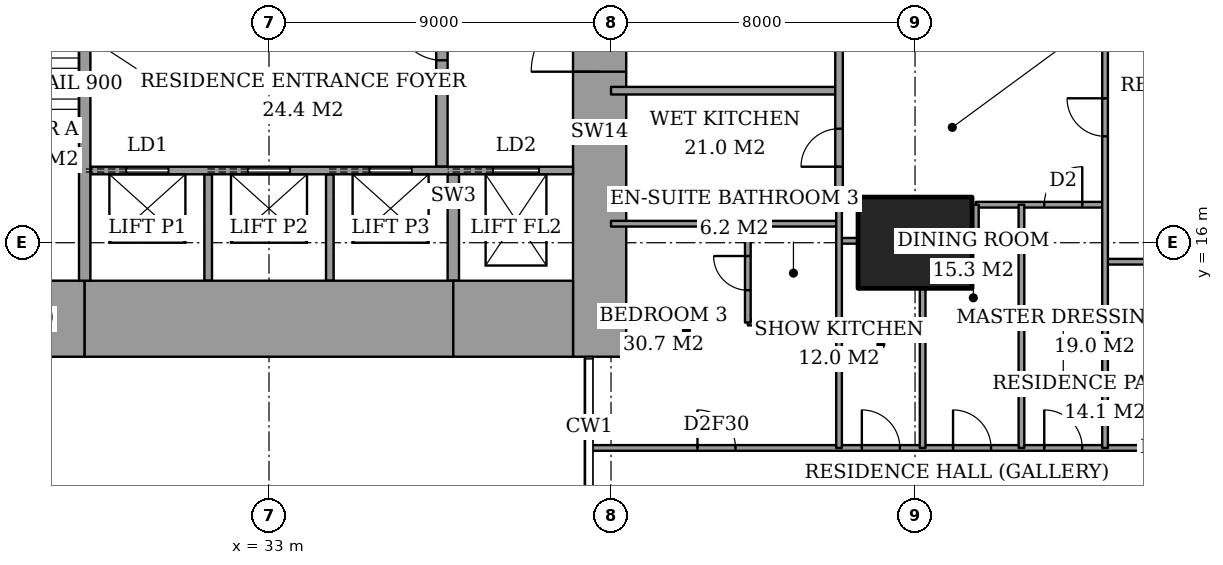
"""IFC4 building model, lengths in metres.
Left out: names, types, materials, properties, quantities, classifications, styles, units other than length and angle.
Written with IfcOpenShell. Run it as: python <this file> out.ifc"""

import sys

from ifc_helpers import new_model, si_unit, direction, frame, frame_2d, origin, origin_2d, place, context, subcontext, project, spatial, rectangle, extrude, element, fill, save


model = new_model("IFC4")
c1 = context("Model", 3, precision=1e-05, world=origin(), true_north=direction((0.0, 1.0)))
c2 = subcontext(c1, "Body", "Model", "MODEL_VIEW")
j1 = project(units=[si_unit("LENGTHUNIT", "METRE"), si_unit("PLANEANGLEUNIT", "RADIAN")], contexts=[c1])
p1 = place(None, origin())
s1 = spatial("IfcSite", under=j1, at=p1, CompositionType="ELEMENT")
p2 = place(p1, origin())
s2 = spatial("IfcBuilding", under=s1, at=p2, CompositionType="ELEMENT")
p3 = place(p2, frame((0.0, 0.0, 62.0)))
s3 = spatial("IfcBuildingStorey", under=s2, at=p3, CompositionType="ELEMENT", Elevation=62.0)
p4 = place(p3, frame((50.0, 16.0, 0.0), z_axis=(0.0, 0.0, 1.0), x_axis=(1.0, 0.0, 0.0)))
e1 = element("IfcColumn", 1, at=p4, inside=s3, PredefinedType="COLUMN", context=c2, shape_type="SweptSolid", body=[
    extrude(rectangle(XDim=3.0, YDim=2.4, at=origin_2d()), origin(), (0.0, 0.0, 1.0), 3.6),
])
p5 = place(p3, frame((25.0, 14.0, 0.0), z_axis=(0.0, 0.0, 1.0), x_axis=(1.0, 0.0, 0.0)))
e2 = element("IfcWall", 2, at=p5, inside=s3, PredefinedType="SHEAR", context=c2, shape_type="SweptSolid", body=[
    extrude(rectangle(XDim=3.15, YDim=2.0, at=frame_2d((1.575, 0.0))), origin(), (0.0, 0.0, 1.0), 3.6),
])
p6 = place(p3, frame((28.15, 14.0, 0.0), z_axis=(0.0, 0.0, 1.0), x_axis=(1.0, 0.0, 0.0)))
e3 = element("IfcWall", 3, at=p6, inside=s3, PredefinedType="SHEAR", context=c2, shape_type="SweptSolid", body=[
    extrude(rectangle(XDim=9.7, YDim=2.0, at=frame_2d((4.85, 0.0))), origin(), (0.0, 0.0, 1.0), 3.6),
])
p7 = place(p3, frame((37.85, 14.0, 0.0), z_axis=(0.0, 0.0, 1.0), x_axis=(1.0, 0.0, 0.0)))
e4 = element("IfcWall", 4, at=p7, inside=s3, PredefinedType="SHEAR", context=c2, shape_type="SweptSolid", body=[
    extrude(rectangle(XDim=3.15, YDim=2.0, at=frame_2d((1.575, 0.0))), origin(), (0.0, 0.0, 1.0), 3.6),
])
p8 = place(p3, frame((41.7, 13.0, 0.0), z_axis=(0.0, 0.0, 1.0), x_axis=(0.0, 1.0, 0.0)))
e5 = element("IfcWall", 5, at=p8, inside=s3, PredefinedType="SHEAR", context=c2, shape_type="SweptSolid", body=[
    extrude(rectangle(XDim=11.85, YDim=1.4, at=frame_2d((5.925, 0.0))), origin(), (0.0, 0.0, 1.0), 3.6),
])
p9 = place(p8, frame((7.5, 0.0, 0.0)))
e6 = element("IfcOpeningElement", 6, at=p9, cuts=e5, PredefinedType="OPENING", context=c2, shape_type="SweptSolid", body=[
    extrude(rectangle(XDim=1.8, YDim=2.4, at=frame_2d((0.9, 1.2))), frame((0.0, 0.71, 0.0), z_axis=(0.0, -1.0, 0.0), x_axis=(1.0, 0.0, 0.0)), (0.0, 0.0, 1.0), 1.42),
])
p10 = place(p3, frame((28.15, 15.0, 0.0), z_axis=(0.0, 0.0, 1.0), x_axis=(0.0, 1.0, 0.0)))
e7 = element("IfcWall", 7, at=p10, inside=s3, PredefinedType="SHEAR", context=c2, shape_type="SweptSolid", body=[
    extrude(rectangle(XDim=8.15, YDim=0.3, at=frame_2d((4.075, 0.0))), origin(), (0.0, 0.0, 1.0), 3.6),
])
p11 = place(p3, frame((37.55, 18.0, 0.0), z_axis=(0.0, 0.0, 1.0), x_axis=(0.0, 1.0, 0.0)))
e8 = element("IfcWall", 8, at=p11, inside=s3, PredefinedType="PARTITIONING", context=c2, shape_type="SweptSolid", body=[
    extrude(rectangle(XDim=6.7, YDim=0.3, at=frame_2d((3.35, 0.0))), origin(), (0.0, 0.0, 1.0), 3.6),
])
p12 = place(p11, frame((2.8, 0.0, 0.0)))
e9 = element("IfcOpeningElement", 9, at=p12, cuts=e8, PredefinedType="OPENING", context=c2, shape_type="SweptSolid", body=[
    extrude(rectangle(XDim=1.2, YDim=2.1, at=frame_2d((0.6, 1.05))), frame((0.0, 0.16, 0.0), z_axis=(0.0, -1.0, 0.0), x_axis=(1.0, 0.0, 0.0)), (0.0, 0.0, 1.0), 0.32),
])
p13 = place(p3, frame((41.439, 10.6, 0.0), z_axis=(0.0, 0.0, 1.0), x_axis=(1.0, 0.0, 0.0)))
e10 = element("IfcWall", 10, at=p13, inside=s3, PredefinedType="PARTITIONING", context=c2, shape_type="SweptSolid", body=[
    extrude(rectangle(XDim=25.011, YDim=0.15, at=frame_2d((12.505, 0.0))), origin(), (0.0, 0.0, 1.0), 3.35),
])
p14 = place(p13, frame((11.961, 0.0, 0.0)))
e11 = element("IfcOpeningElement", 11, at=p14, cuts=e10, PredefinedType="OPENING", context=c2, shape_type="SweptSolid", body=[
    extrude(rectangle(XDim=1.0, YDim=2.1, at=frame_2d((0.5, 1.05))), frame((0.0, 0.085, 0.0), z_axis=(0.0, -1.0, 0.0), x_axis=(1.0, 0.0, 0.0)), (0.0, 0.0, 1.0), 0.17),
])
p15 = place(p13, frame((20.924, 0.0, 0.0)))
e12 = element("IfcOpeningElement", 12, at=p15, cuts=e10, PredefinedType="OPENING", context=c2, shape_type="SweptSolid", body=[
    extrude(rectangle(XDim=1.0, YDim=2.1, at=frame_2d((0.5, 1.05))), frame((0.0, 0.085, 0.0), z_axis=(0.0, -1.0, 0.0), x_axis=(1.0, 0.0, 0.0)), (0.0, 0.0, 1.0), 0.17),
])
p16 = place(p13, frame((9.561, 0.0, 0.0)))
e13 = element("IfcOpeningElement", 13, at=p16, cuts=e10, PredefinedType="OPENING", context=c2, shape_type="SweptSolid", body=[
    extrude(rectangle(XDim=1.0, YDim=2.1, at=frame_2d((0.5, 1.05))), frame((0.0, 0.085, 0.0), z_axis=(0.0, -1.0, 0.0), x_axis=(1.0, 0.0, 0.0)), (0.0, 0.0, 1.0), 0.17),
])
p17 = place(p13, frame((7.161, 0.0, 0.0)))
e14 = element("IfcOpeningElement", 14, at=p17, cuts=e10, PredefinedType="OPENING", context=c2, shape_type="SweptSolid", body=[
    extrude(rectangle(XDim=1.0, YDim=2.1, at=frame_2d((0.5, 1.05))), frame((0.0, 0.085, 0.0), z_axis=(0.0, -1.0, 0.0), x_axis=(1.0, 0.0, 0.0)), (0.0, 0.0, 1.0), 0.17),
])
p18 = place(p13, frame((2.836, 0.0, 0.0)))
e15 = element("IfcOpeningElement", 15, at=p18, cuts=e10, PredefinedType="OPENING", context=c2, shape_type="SweptSolid", body=[
    extrude(rectangle(XDim=1.0, YDim=2.1, at=frame_2d((0.5, 1.05))), frame((0.0, 0.085, 0.0), z_axis=(0.0, -1.0, 0.0), x_axis=(1.0, 0.0, 0.0)), (0.0, 0.0, 1.0), 0.17),
])
p19 = place(p3, frame((45.6, 13.9, 0.0), z_axis=(0.0, 0.0, 1.0), x_axis=(1.0, 0.0, 0.0)))
e16 = element("IfcWall", 16, at=p19, inside=s3, PredefinedType="PARTITIONING", context=c2, shape_type="SweptSolid", body=[
    extrude(rectangle(XDim=2.4, YDim=0.15, at=frame_2d((1.2, 0.0))), origin(), (0.0, 0.0, 1.0), 3.35),
])
p20 = place(p3, frame((55.0, 15.5, 0.0), z_axis=(0.0, 0.0, 1.0), x_axis=(1.0, 0.0, 0.0)))
e17 = element("IfcWall", 17, at=p20, inside=s3, PredefinedType="PARTITIONING", context=c2, shape_type="SweptSolid", body=[
    extrude(rectangle(XDim=1.5, YDim=0.15, at=frame_2d((0.75, 0.0))), origin(), (0.0, 0.0, 1.0), 3.35),
])
p21 = place(p3, frame((48.0, 16.05, 0.0), z_axis=(0.0, 0.0, 1.0), x_axis=(1.0, 0.0, 0.0)))
e18 = element("IfcWall", 18, at=p21, inside=s3, PredefinedType="PARTITIONING", context=c2, shape_type="SweptSolid", body=[
    extrude(rectangle(XDim=0.5, YDim=0.15, at=frame_2d((0.25, 0.0))), origin(), (0.0, 0.0, 1.0), 2.634),
])
p22 = place(p3, frame((42.0, 16.5, 0.0), z_axis=(0.0, 0.0, 1.0), x_axis=(1.0, 0.0, 0.0)))
e19 = element("IfcWall", 19, at=p22, inside=s3, PredefinedType="PARTITIONING", context=c2, shape_type="SweptSolid", body=[
    extrude(rectangle(XDim=6.0, YDim=0.15, at=frame_2d((3.0, 0.0))), origin(), (0.0, 0.0, 1.0), 3.35),
])
p23 = place(p3, frame((51.6, 17.0, 0.0), z_axis=(0.0, 0.0, 1.0), x_axis=(1.0, 0.0, 0.0)))
e20 = element("IfcWall", 20, at=p23, inside=s3, PredefinedType="PARTITIONING", context=c2, shape_type="SweptSolid", body=[
    extrude(rectangle(XDim=3.4, YDim=0.15, at=frame_2d((1.7, 0.0))), origin(), (0.0, 0.0, 1.0), 3.35),
])
p24 = place(p23, frame((1.8, 0.0, 0.0)))
e21 = element("IfcOpeningElement", 21, at=p24, cuts=e20, PredefinedType="OPENING", context=c2, shape_type="SweptSolid", body=[
    extrude(rectangle(XDim=1.0, YDim=2.1, at=frame_2d((0.5, 1.05))), frame((0.0, 0.085, 0.0), z_axis=(0.0, -1.0, 0.0), x_axis=(1.0, 0.0, 0.0)), (0.0, 0.0, 1.0), 0.17),
])
p25 = place(p3, frame((42.0, 20.0, 0.0), z_axis=(0.0, 0.0, 1.0), x_axis=(1.0, 0.0, 0.0)))
e22 = element("IfcWall", 22, at=p25, inside=s3, PredefinedType="PARTITIONING", context=c2, shape_type="SweptSolid", body=[
    extrude(rectangle(XDim=6.0, YDim=0.2, at=frame_2d((3.0, 0.0))), origin(), (0.0, 0.0, 1.0), 3.35),
])
p26 = place(p3, frame((45.6, 13.9, 0.0), z_axis=(0.0, 0.0, 1.0), x_axis=(0.0, 1.0, 0.0)))
e23 = element("IfcWall", 23, at=p26, inside=s3, PredefinedType="PARTITIONING", context=c2, shape_type="SweptSolid", body=[
    extrude(rectangle(XDim=2.6, YDim=0.15, at=frame_2d((1.3, 0.0))), origin(), (0.0, 0.0, 1.0), 3.35),
])
p27 = place(p26, frame((0.85, 0.0, 0.0)))
e24 = element("IfcOpeningElement", 24, at=p27, cuts=e23, PredefinedType="OPENING", context=c2, shape_type="SweptSolid", body=[
    extrude(rectangle(XDim=0.9, YDim=2.1, at=frame_2d((0.45, 1.05))), frame((0.0, 0.085, 0.0), z_axis=(0.0, -1.0, 0.0), x_axis=(1.0, 0.0, 0.0)), (0.0, 0.0, 1.0), 0.17),
])
p28 = place(p3, frame((48.0, 17.0, 0.0), z_axis=(0.0, 0.0, 1.0), x_axis=(0.0, 1.0, 0.0)))
e25 = element("IfcWall", 25, at=p28, inside=s3, PredefinedType="PARTITIONING", context=c2, shape_type="SweptSolid", body=[
    extrude(rectangle(XDim=7.0, YDim=0.2, at=frame_2d((3.5, 0.0))), origin(), (0.0, 0.0, 1.0), 3.35),
])
p29 = place(p28, frame((4.4, 0.0, 0.0)))
e26 = element("IfcOpeningElement", 26, at=p29, cuts=e25, PredefinedType="OPENING", context=c2, shape_type="SweptSolid", body=[
    extrude(rectangle(XDim=1.2, YDim=2.4, at=frame_2d((0.6, 1.2))), frame((0.0, 0.11, 0.0), z_axis=(0.0, -1.0, 0.0), x_axis=(1.0, 0.0, 0.0)), (0.0, 0.0, 1.0), 0.22),
])
p30 = place(p28, frame((1.0, 0.0, 0.0)))
e27 = element("IfcOpeningElement", 27, at=p30, cuts=e25, PredefinedType="OPENING", context=c2, shape_type="SweptSolid", body=[
    extrude(rectangle(XDim=1.0, YDim=2.1, at=frame_2d((0.5, 1.05))), frame((0.0, 0.11, 0.0), z_axis=(0.0, -1.0, 0.0), x_axis=(1.0, 0.0, 0.0)), (0.0, 0.0, 1.0), 0.22),
])
p31 = place(p3, frame((48.0, 10.6, 0.0), z_axis=(0.0, 0.0, 1.0), x_axis=(0.0, 1.0, 0.0)))
e28 = element("IfcWall", 28, at=p31, inside=s3, PredefinedType="PARTITIONING", context=c2, shape_type="SweptSolid", body=[
    extrude(rectangle(XDim=6.4, YDim=0.15, at=frame_2d((3.2, 0.0))), origin(), (0.0, 0.0, 1.0), 3.35),
])
p32 = place(p3, frame((50.2, 10.6, 0.0), z_axis=(0.0, 0.0, 1.0), x_axis=(0.0, 1.0, 0.0)))
e29 = element("IfcWall", 29, at=p32, inside=s3, PredefinedType="PARTITIONING", context=c2, shape_type="SweptSolid", body=[
    extrude(rectangle(XDim=4.2, YDim=0.15, at=frame_2d((2.1, 0.0))), origin(), (0.0, 0.0, 1.0), 3.35),
])
p33 = place(p3, frame((51.6, 16.05, 0.0), z_axis=(0.0, 0.0, 1.0), x_axis=(0.0, 1.0, 0.0)))
e30 = element("IfcWall", 30, at=p33, inside=s3, PredefinedType="PARTITIONING", context=c2, shape_type="SweptSolid", body=[
    extrude(rectangle(XDim=0.95, YDim=0.15, at=frame_2d((0.475, 0.0))), origin(), (0.0, 0.0, 1.0), 3.35),
])
p34 = place(p3, frame((52.8, 10.6, 0.0), z_axis=(0.0, 0.0, 1.0), x_axis=(0.0, 1.0, 0.0)))
e31 = element("IfcWall", 31, at=p34, inside=s3, PredefinedType="PARTITIONING", context=c2, shape_type="SweptSolid", body=[
    extrude(rectangle(XDim=6.4, YDim=0.15, at=frame_2d((3.2, 0.0))), origin(), (0.0, 0.0, 1.0), 3.35),
])
p35 = place(p3, frame((55.0, 10.6, 0.0), z_axis=(0.0, 0.0, 1.0), x_axis=(0.0, 1.0, 0.0)))
e32 = element("IfcWall", 32, at=p35, inside=s3, PredefinedType="PARTITIONING", context=c2, shape_type="SweptSolid", body=[
    extrude(rectangle(XDim=11.0, YDim=0.15, at=frame_2d((5.5, 0.0))), origin(), (0.0, 0.0, 1.0), 3.35),
])
p36 = place(p35, frame((8.2, 0.0, 0.0)))
e33 = element("IfcOpeningElement", 33, at=p36, cuts=e32, PredefinedType="OPENING", context=c2, shape_type="SweptSolid", body=[
    extrude(rectangle(XDim=1.0, YDim=2.1, at=frame_2d((0.5, 1.05))), frame((0.0, 0.085, 0.0), z_axis=(0.0, -1.0, 0.0), x_axis=(1.0, 0.0, 0.0)), (0.0, 0.0, 1.0), 0.17),
])
p37 = place(p3, frame((28.3, 17.9, 0.0), z_axis=(0.0, 0.0, 1.0), x_axis=(1.0, 0.0, 0.0)))
e34 = element("IfcWall", 34, at=p37, inside=s3, PredefinedType="PARTITIONING", context=c2, shape_type="SweptSolid", body=[
    extrude(rectangle(XDim=12.7, YDim=0.2, at=frame_2d((6.35, 0.0))), origin(), (0.0, 0.0, 1.0), 3.6),
])
p38 = place(p37, frame((0.95, 0.0, 0.0)))
e35 = element("IfcOpeningElement", 35, at=p38, cuts=e34, PredefinedType="OPENING", context=c2, shape_type="SweptSolid", body=[
    extrude(rectangle(XDim=1.1, YDim=2.1, at=frame_2d((0.55, 1.05))), frame((0.0, 0.11, 0.0), z_axis=(0.0, -1.0, 0.0), x_axis=(1.0, 0.0, 0.0)), (0.0, 0.0, 1.0), 0.22),
])
p39 = place(p37, frame((4.15, 0.0, 0.0)))
e36 = element("IfcOpeningElement", 36, at=p39, cuts=e34, PredefinedType="OPENING", context=c2, shape_type="SweptSolid", body=[
    extrude(rectangle(XDim=1.1, YDim=2.1, at=frame_2d((0.55, 1.05))), frame((0.0, 0.11, 0.0), z_axis=(0.0, -1.0, 0.0), x_axis=(1.0, 0.0, 0.0)), (0.0, 0.0, 1.0), 0.22),
])
p40 = place(p37, frame((7.35, 0.0, 0.0)))
e37 = element("IfcOpeningElement", 37, at=p40, cuts=e34, PredefinedType="OPENING", context=c2, shape_type="SweptSolid", body=[
    extrude(rectangle(XDim=1.1, YDim=2.1, at=frame_2d((0.55, 1.05))), frame((0.0, 0.11, 0.0), z_axis=(0.0, -1.0, 0.0), x_axis=(1.0, 0.0, 0.0)), (0.0, 0.0, 1.0), 0.22),
])
p41 = place(p37, frame((10.6, 0.0, 0.0)))
e38 = element("IfcOpeningElement", 38, at=p41, cuts=e34, PredefinedType="OPENING", context=c2, shape_type="SweptSolid", body=[
    extrude(rectangle(XDim=1.2, YDim=2.1, at=frame_2d((0.6, 1.05))), frame((0.0, 0.11, 0.0), z_axis=(0.0, -1.0, 0.0), x_axis=(1.0, 0.0, 0.0)), (0.0, 0.0, 1.0), 0.22),
])
for number, where, z_axis, x_axis in (
    (39, (31.4, 15.0, 0.0), (0.0, 0.0, 1.0), (0.0, 1.0, 0.0)),
    (40, (34.6, 15.0, 0.0), (0.0, 0.0, 1.0), (0.0, 1.0, 0.0)),
):
    element("IfcWall", number, at=place(p3, frame(where, z_axis=z_axis, x_axis=x_axis)), inside=s3, PredefinedType="PARTITIONING", context=c2, shape_type="SweptSolid", body=[
        extrude(rectangle(XDim=2.8, YDim=0.2, at=frame_2d((1.4, 0.0))), origin(), (0.0, 0.0, 1.0), 3.6),
    ])
p42 = place(p3, frame((37.85, 15.0, 0.0), z_axis=(0.0, 0.0, 1.0), x_axis=(0.0, 1.0, 0.0)))
e41 = element("IfcWall", 41, at=p42, inside=s3, PredefinedType="SHEAR", context=c2, shape_type="SweptSolid", body=[
    extrude(rectangle(XDim=2.8, YDim=0.3, at=frame_2d((1.4, 0.0))), origin(), (0.0, 0.0, 1.0), 3.6),
])
p43 = place(p14, origin())
e42 = element("IfcDoor", 42, at=p43, inside=s3, OperationType="SINGLE_SWING_RIGHT", PredefinedType="DOOR", context=c2, shape_type="SweptSolid", body=[
    extrude(rectangle(XDim=1.0, YDim=2.1, at=frame_2d((0.5, 1.05))), frame((0.0, 0.025, 0.0), z_axis=(0.0, -1.0, 0.0), x_axis=(1.0, 0.0, 0.0)), (0.0, 0.0, 1.0), 0.05),
])
fill(e11, e42)
p44 = place(p36, origin())
e43 = element("IfcDoor", 43, at=p44, inside=s3, OperationType="SINGLE_SWING_LEFT", PredefinedType="DOOR", context=c2, shape_type="SweptSolid", body=[
    extrude(rectangle(XDim=1.0, YDim=2.1, at=frame_2d((0.5, 1.05))), frame((0.0, 0.025, 0.0), z_axis=(0.0, -1.0, 0.0), x_axis=(1.0, 0.0, 0.0)), (0.0, 0.0, 1.0), 0.05),
])
fill(e33, e43)
p45 = place(p24, origin())
e44 = element("IfcDoor", 44, at=p45, inside=s3, OperationType="SINGLE_SWING_LEFT", PredefinedType="DOOR", context=c2, shape_type="SweptSolid", body=[
    extrude(rectangle(XDim=1.0, YDim=2.1, at=frame_2d((0.5, 1.05))), frame((0.0, 0.025, 0.0), z_axis=(0.0, -1.0, 0.0), x_axis=(1.0, 0.0, 0.0)), (0.0, 0.0, 1.0), 0.05),
])
fill(e21, e44)
p46 = place(p16, origin())
e45 = element("IfcDoor", 45, at=p46, inside=s3, OperationType="SINGLE_SWING_RIGHT", PredefinedType="DOOR", context=c2, shape_type="SweptSolid", body=[
    extrude(rectangle(XDim=1.0, YDim=2.1, at=frame_2d((0.5, 1.05))), frame((0.0, 0.025, 0.0), z_axis=(0.0, -1.0, 0.0), x_axis=(1.0, 0.0, 0.0)), (0.0, 0.0, 1.0), 0.05),
])
fill(e13, e45)
p47 = place(p17, origin())
e46 = element("IfcDoor", 46, at=p47, inside=s3, OperationType="SINGLE_SWING_RIGHT", PredefinedType="DOOR", context=c2, shape_type="SweptSolid", body=[
    extrude(rectangle(XDim=1.0, YDim=2.1, at=frame_2d((0.5, 1.05))), frame((0.0, 0.025, 0.0), z_axis=(0.0, -1.0, 0.0), x_axis=(1.0, 0.0, 0.0)), (0.0, 0.0, 1.0), 0.05),
])
fill(e14, e46)
p48 = place(p27, origin())
e47 = element("IfcDoor", 47, at=p48, inside=s3, OperationType="SINGLE_SWING_LEFT", PredefinedType="DOOR", context=c2, shape_type="SweptSolid", body=[
    extrude(rectangle(XDim=0.9, YDim=2.1, at=frame_2d((0.45, 1.05))), frame((0.0, 0.025, 0.0), z_axis=(0.0, -1.0, 0.0), x_axis=(1.0, 0.0, 0.0)), (0.0, 0.0, 1.0), 0.05),
])
fill(e24, e47)
p49 = place(p18, origin())
e48 = element("IfcDoor", 48, at=p49, inside=s3, OperationType="SINGLE_SWING_RIGHT", PredefinedType="DOOR", context=c2, shape_type="SweptSolid", body=[
    extrude(rectangle(XDim=1.0, YDim=2.1, at=frame_2d((0.5, 1.05))), frame((0.0, 0.025, 0.0), z_axis=(0.0, -1.0, 0.0), x_axis=(1.0, 0.0, 0.0)), (0.0, 0.0, 1.0), 0.05),
])
fill(e15, e48)
p50 = place(p30, origin())
e49 = element("IfcDoor", 49, at=p50, inside=s3, OperationType="SINGLE_SWING_RIGHT", PredefinedType="DOOR", context=c2, shape_type="SweptSolid", body=[
    extrude(rectangle(XDim=1.0, YDim=2.1, at=frame_2d((0.5, 1.05))), frame((0.0, 0.025, 0.0), z_axis=(0.0, -1.0, 0.0), x_axis=(1.0, 0.0, 0.0)), (0.0, 0.0, 1.0), 0.05),
])
fill(e27, e49)
p51 = place(p12, origin())
e50 = element("IfcDoor", 50, at=p51, inside=s3, OperationType="SINGLE_SWING_LEFT", PredefinedType="DOOR", context=c2, shape_type="SweptSolid", body=[
    extrude(rectangle(XDim=1.2, YDim=2.1, at=frame_2d((0.6, 1.05))), frame((0.0, 0.025, 0.0), z_axis=(0.0, -1.0, 0.0), x_axis=(1.0, 0.0, 0.0)), (0.0, 0.0, 1.0), 0.05),
])
fill(e9, e50)
p52 = place(p9, origin())
e51 = element("IfcDoor", 51, at=p52, inside=s3, OperationType="DOUBLE_DOOR_DOUBLE_SWING", PredefinedType="DOOR", context=c2, shape_type="SweptSolid", body=[
    extrude(rectangle(XDim=1.8, YDim=2.4, at=frame_2d((0.9, 1.2))), frame((0.0, 0.025, 0.0), z_axis=(0.0, -1.0, 0.0), x_axis=(1.0, 0.0, 0.0)), (0.0, 0.0, 1.0), 0.05),
])
fill(e6, e51)
p53 = place(p38, origin())
e52 = element("IfcDoor", 52, at=p53, inside=s3, OperationType="SLIDING_TO_LEFT", PredefinedType="DOOR", context=c2, shape_type="SweptSolid", body=[
    extrude(rectangle(XDim=1.1, YDim=2.1, at=frame_2d((0.55, 1.05))), frame((0.0, 0.025, 0.0), z_axis=(0.0, -1.0, 0.0), x_axis=(1.0, 0.0, 0.0)), (0.0, 0.0, 1.0), 0.05),
])
fill(e35, e52)
p54 = place(p39, origin())
e53 = element("IfcDoor", 53, at=p54, inside=s3, OperationType="SLIDING_TO_LEFT", PredefinedType="DOOR", context=c2, shape_type="SweptSolid", body=[
    extrude(rectangle(XDim=1.1, YDim=2.1, at=frame_2d((0.55, 1.05))), frame((0.0, 0.025, 0.0), z_axis=(0.0, -1.0, 0.0), x_axis=(1.0, 0.0, 0.0)), (0.0, 0.0, 1.0), 0.05),
])
fill(e36, e53)
p55 = place(p40, origin())
e54 = element("IfcDoor", 54, at=p55, inside=s3, OperationType="SLIDING_TO_LEFT", PredefinedType="DOOR", context=c2, shape_type="SweptSolid", body=[
    extrude(rectangle(XDim=1.1, YDim=2.1, at=frame_2d((0.55, 1.05))), frame((0.0, 0.025, 0.0), z_axis=(0.0, -1.0, 0.0), x_axis=(1.0, 0.0, 0.0)), (0.0, 0.0, 1.0), 0.05),
])
fill(e37, e54)
p56 = place(p41, origin())
e55 = element("IfcDoor", 55, at=p56, inside=s3, OperationType="SLIDING_TO_LEFT", PredefinedType="DOOR", context=c2, shape_type="SweptSolid", body=[
    extrude(rectangle(XDim=1.2, YDim=2.1, at=frame_2d((0.6, 1.05))), frame((0.0, 0.025, 0.0), z_axis=(0.0, -1.0, 0.0), x_axis=(1.0, 0.0, 0.0)), (0.0, 0.0, 1.0), 0.05),
])
fill(e38, e55)
save(model, sys.argv[1])
